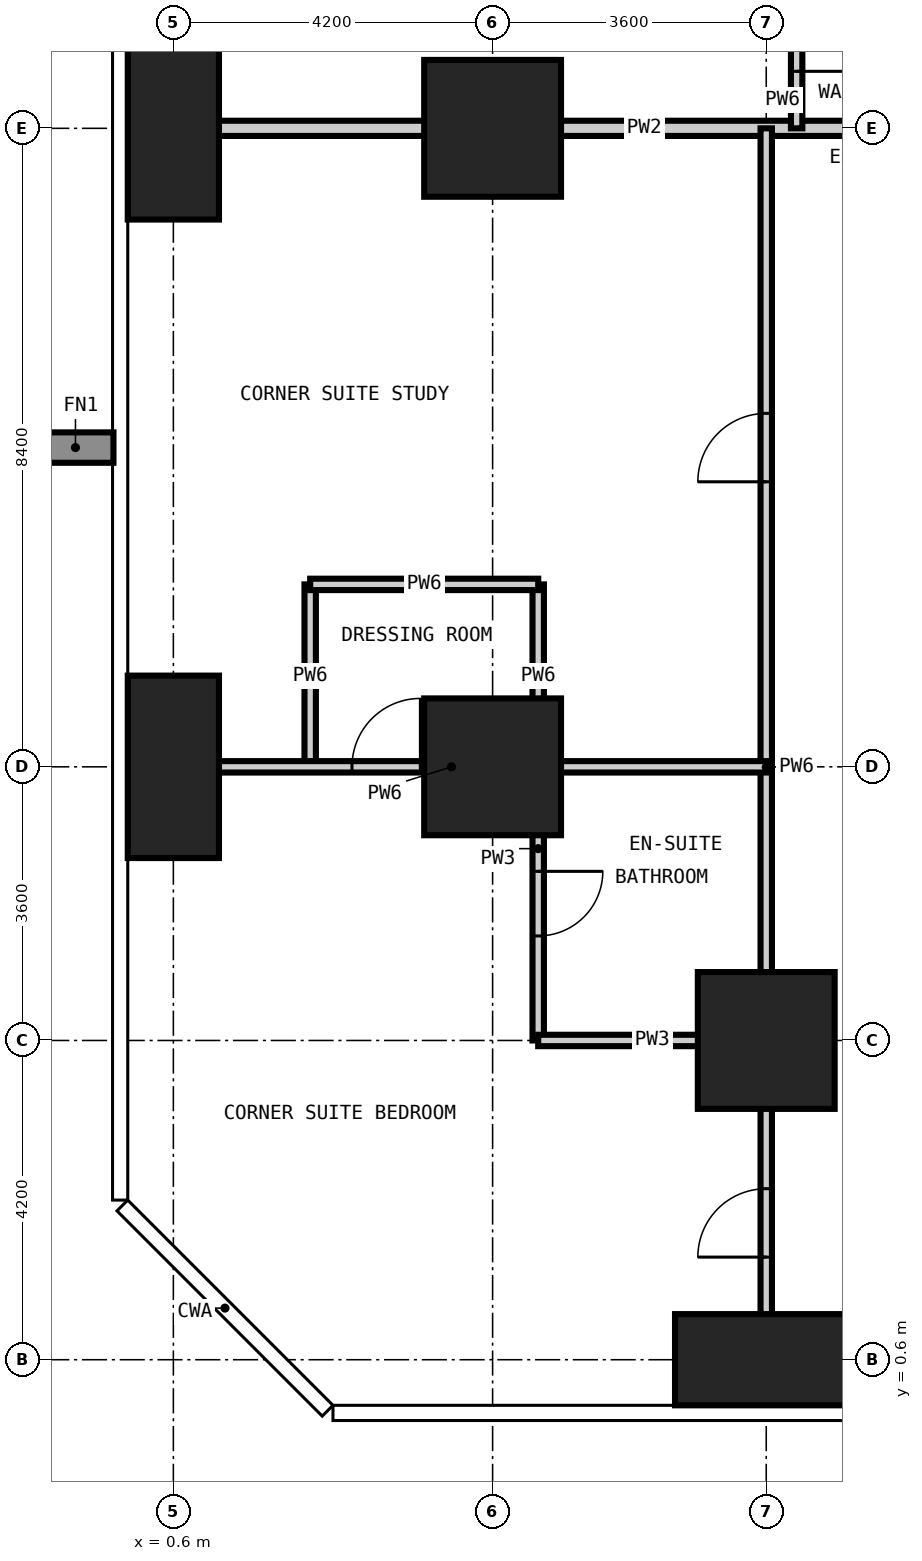
"""IFC4 building model, lengths in metres.
Left out: names, types, materials, properties, quantities, classifications, styles, units other than length and angle.
Written with IfcOpenShell. Run it as: python <this file> out.ifc"""

import sys

from ifc_helpers import new_model, si_unit, direction, frame, frame_2d, origin, origin_2d, place, context, subcontext, project, spatial, rectangle, extrude, element, fill, save


model = new_model("IFC4")
c1 = context("Model", 3, precision=1e-05, world=origin(), true_north=direction((0.0, 1.0)))
c2 = subcontext(c1, "Body", "Model", "MODEL_VIEW")
j1 = project(units=[si_unit("LENGTHUNIT", "METRE"), si_unit("PLANEANGLEUNIT", "RADIAN")], contexts=[c1])
p1 = place(None, origin())
s1 = spatial("IfcSite", under=j1, at=p1, CompositionType="ELEMENT")
p2 = place(p1, origin())
s2 = spatial("IfcBuilding", under=s1, at=p2, CompositionType="ELEMENT")
p3 = place(p2, frame((0.0, 0.0, 30.6)))
s3 = spatial("IfcBuildingStorey", under=s2, at=p3, CompositionType="ELEMENT", Elevation=30.6)
for number, where, z_axis, x_axis in (
    (1, (0.6, 8.4, -0.35), (0.0, 0.0, 1.0), (1.0, 0.0, 0.0)),
    (2, (0.6, 16.8, -0.35), (0.0, 0.0, 1.0), (1.0, 0.0, 0.0)),
):
    element("IfcColumn", number, at=place(p3, frame(where, z_axis=z_axis, x_axis=x_axis)), inside=s3, PredefinedType="COLUMN", context=c2, shape_type="SweptSolid", body=[
        extrude(rectangle(XDim=1.2, YDim=2.4, at=origin_2d()), origin(), (0.0, 0.0, 1.0), 3.6),
    ])
for number, where, z_axis, x_axis in (
    (3, (4.8, 8.4, -0.35), (0.0, 0.0, 1.0), (1.0, 0.0, 0.0)),
    (4, (4.8, 16.8, -0.35), (0.0, 0.0, 1.0), (1.0, 0.0, 0.0)),
):
    element("IfcColumn", number, at=place(p3, frame(where, z_axis=z_axis, x_axis=x_axis)), inside=s3, PredefinedType="COLUMN", context=c2, shape_type="SweptSolid", body=[
        extrude(rectangle(XDim=1.8, YDim=1.8, at=origin_2d()), origin(), (0.0, 0.0, 1.0), 3.6),
    ])
p4 = place(p3, frame((8.4, 0.6, -0.35), z_axis=(0.0, 0.0, 1.0), x_axis=(1.0, 0.0, 0.0)))
e5 = element("IfcColumn", 5, at=p4, inside=s3, PredefinedType="COLUMN", context=c2, shape_type="SweptSolid", body=[
    extrude(rectangle(XDim=2.4, YDim=1.2, at=origin_2d()), origin(), (0.0, 0.0, 1.0), 3.6),
])
p5 = place(p3, frame((8.4, 4.8, -0.35), z_axis=(0.0, 0.0, 1.0), x_axis=(1.0, 0.0, 0.0)))
e6 = element("IfcColumn", 6, at=p5, inside=s3, PredefinedType="COLUMN", context=c2, shape_type="SweptSolid", body=[
    extrude(rectangle(XDim=1.8, YDim=1.8, at=origin_2d()), origin(), (0.0, 0.0, 1.0), 3.6),
])
p6 = place(p3, frame((5.4, 4.8, 0.0), z_axis=(0.0, 0.0, 1.0), x_axis=(0.0, 1.0, 0.0)))
e7 = element("IfcWall", 7, at=p6, inside=s3, PredefinedType="PARTITIONING", context=c2, shape_type="SweptSolid", body=[
    extrude(rectangle(XDim=3.6, YDim=0.15, at=frame_2d((1.8, 0.0))), origin(), (0.0, 0.0, 1.0), 3.25),
])
p7 = place(p6, frame((1.375, 0.0, 0.0)))
e8 = element("IfcOpeningElement", 8, at=p7, cuts=e7, PredefinedType="OPENING", context=c2, shape_type="SweptSolid", body=[
    extrude(rectangle(XDim=0.85, YDim=2.1, at=frame_2d((0.425, 1.05))), frame((0.0, 0.085, 0.0), z_axis=(0.0, -1.0, 0.0), x_axis=(1.0, 0.0, 0.0)), (0.0, 0.0, 1.0), 0.17),
])
p8 = place(p3, frame((5.4, 4.8, 0.0), z_axis=(0.0, 0.0, 1.0), x_axis=(1.0, 0.0, 0.0)))
e9 = element("IfcWall", 9, at=p8, inside=s3, PredefinedType="PARTITIONING", context=c2, shape_type="SweptSolid", body=[
    extrude(rectangle(XDim=3.0, YDim=0.15, at=frame_2d((1.5, 0.0))), origin(), (0.0, 0.0, 1.0), 3.25),
])
p9 = place(p3, frame((-0.008, 16.8, 0.0), z_axis=(0.0, 0.0, 1.0), x_axis=(1.0, 0.0, 0.0)))
e10 = element("IfcWall", 10, at=p9, inside=s3, PredefinedType="PARTITIONING", context=c2, shape_type="SweptSolid", body=[
    extrude(rectangle(XDim=13.608, YDim=0.2, at=frame_2d((6.804, 0.0))), origin(), (0.0, 0.0, 1.0), 3.25),
])
for number, where, z_axis, x_axis in (
    (11, (2.4, 8.4, 0.0), (0.0, 0.0, 1.0), (0.0, 1.0, 0.0)),
    (12, (5.4, 8.4, 0.0), (0.0, 0.0, 1.0), (0.0, 1.0, 0.0)),
):
    element("IfcWall", number, at=place(p3, frame(where, z_axis=z_axis, x_axis=x_axis)), inside=s3, PredefinedType="PARTITIONING", context=c2, shape_type="SweptSolid", body=[
        extrude(rectangle(XDim=2.4, YDim=0.15, at=frame_2d((1.2, 0.0))), origin(), (0.0, 0.0, 1.0), 3.25),
    ])
p10 = place(p3, frame((8.4, -0.008, 0.0), z_axis=(0.0, 0.0, 1.0), x_axis=(0.0, 1.0, 0.0)))
e13 = element("IfcWall", 13, at=p10, inside=s3, PredefinedType="PARTITIONING", context=c2, shape_type="SweptSolid", body=[
    extrude(rectangle(XDim=16.808, YDim=0.15, at=frame_2d((8.404, 0.0))), origin(), (0.0, 0.0, 1.0), 3.25),
])
p11 = place(p10, frame((1.958, 0.0, 0.0)))
e14 = element("IfcOpeningElement", 14, at=p11, cuts=e13, PredefinedType="OPENING", context=c2, shape_type="SweptSolid", body=[
    extrude(rectangle(XDim=0.9, YDim=2.1, at=frame_2d((0.45, 1.05))), frame((0.0, 0.085, 0.0), z_axis=(0.0, -1.0, 0.0), x_axis=(1.0, 0.0, 0.0)), (0.0, 0.0, 1.0), 0.17),
])
p12 = place(p10, frame((12.158, 0.0, 0.0)))
e15 = element("IfcOpeningElement", 15, at=p12, cuts=e13, PredefinedType="OPENING", context=c2, shape_type="SweptSolid", body=[
    extrude(rectangle(XDim=0.9, YDim=2.1, at=frame_2d((0.45, 1.05))), frame((0.0, 0.085, 0.0), z_axis=(0.0, -1.0, 0.0), x_axis=(1.0, 0.0, 0.0)), (0.0, 0.0, 1.0), 0.17),
])
p13 = place(p3, frame((8.8, 16.8, 0.0), z_axis=(0.0, 0.0, 1.0), x_axis=(0.0, 1.0, 0.0)))
e16 = element("IfcWall", 16, at=p13, inside=s3, PredefinedType="PARTITIONING", context=c2, shape_type="SweptSolid", body=[
    extrude(rectangle(XDim=2.4, YDim=0.15, at=frame_2d((1.2, 0.0))), origin(), (0.0, 0.0, 1.0), 3.25),
])
p14 = place(p13, frame((0.75, 0.0, 0.0)))
e17 = element("IfcOpeningElement", 17, at=p14, cuts=e16, PredefinedType="OPENING", context=c2, shape_type="SweptSolid", body=[
    extrude(rectangle(XDim=0.9, YDim=2.1, at=frame_2d((0.45, 1.05))), frame((0.0, 0.085, 0.0), z_axis=(0.0, -1.0, 0.0), x_axis=(1.0, 0.0, 0.0)), (0.0, 0.0, 1.0), 0.17),
])
p15 = place(p3, frame((-0.008, 8.4, 0.0), z_axis=(0.0, 0.0, 1.0), x_axis=(1.0, 0.0, 0.0)))
e18 = element("IfcWall", 18, at=p15, inside=s3, PredefinedType="PARTITIONING", context=c2, shape_type="SweptSolid", body=[
    extrude(rectangle(XDim=8.408, YDim=0.15, at=frame_2d((4.204, 0.0))), origin(), (0.0, 0.0, 1.0), 3.25),
])
p16 = place(p15, frame((2.958, 0.0, 0.0)))
e19 = element("IfcOpeningElement", 19, at=p16, cuts=e18, PredefinedType="OPENING", context=c2, shape_type="SweptSolid", body=[
    extrude(rectangle(XDim=0.9, YDim=2.1, at=frame_2d((0.45, 1.05))), frame((0.0, 0.085, 0.0), z_axis=(0.0, -1.0, 0.0), x_axis=(1.0, 0.0, 0.0)), (0.0, 0.0, 1.0), 0.17),
])
p17 = place(p3, frame((2.4, 10.8, 0.0), z_axis=(0.0, 0.0, 1.0), x_axis=(1.0, 0.0, 0.0)))
e20 = element("IfcWall", 20, at=p17, inside=s3, PredefinedType="PARTITIONING", context=c2, shape_type="SweptSolid", body=[
    extrude(rectangle(XDim=3.0, YDim=0.15, at=frame_2d((1.5, 0.0))), origin(), (0.0, 0.0, 1.0), 3.25),
])
p18 = place(p14, frame((0.9, 0.0, 0.0), z_axis=(0.0, 0.0, 1.0), x_axis=(-1.0, 0.0, 0.0)))
e21 = element("IfcDoor", 21, at=p18, inside=s3, OperationType="SINGLE_SWING_RIGHT", PredefinedType="DOOR", context=c2, shape_type="SweptSolid", body=[
    extrude(rectangle(XDim=0.9, YDim=2.1, at=frame_2d((0.45, 1.05))), frame((0.0, 0.025, 0.0), z_axis=(0.0, -1.0, 0.0), x_axis=(1.0, 0.0, 0.0)), (0.0, 0.0, 1.0), 0.05),
])
fill(e17, e21)
p19 = place(p11, origin())
e22 = element("IfcDoor", 22, at=p19, inside=s3, OperationType="SINGLE_SWING_LEFT", PredefinedType="DOOR", context=c2, shape_type="SweptSolid", body=[
    extrude(rectangle(XDim=0.9, YDim=2.1, at=frame_2d((0.45, 1.05))), frame((0.0, 0.025, 0.0), z_axis=(0.0, -1.0, 0.0), x_axis=(1.0, 0.0, 0.0)), (0.0, 0.0, 1.0), 0.05),
])
fill(e14, e22)
p20 = place(p7, frame((0.85, 0.0, 0.0), z_axis=(0.0, 0.0, 1.0), x_axis=(-1.0, 0.0, 0.0)))
e23 = element("IfcDoor", 23, at=p20, inside=s3, OperationType="SINGLE_SWING_LEFT", PredefinedType="DOOR", context=c2, shape_type="SweptSolid", body=[
    extrude(rectangle(XDim=0.85, YDim=2.1, at=frame_2d((0.425, 1.05))), frame((0.0, 0.025, 0.0), z_axis=(0.0, -1.0, 0.0), x_axis=(1.0, 0.0, 0.0)), (0.0, 0.0, 1.0), 0.05),
])
fill(e8, e23)
p21 = place(p16, origin())
e24 = element("IfcDoor", 24, at=p21, inside=s3, OperationType="SINGLE_SWING_RIGHT", PredefinedType="DOOR", context=c2, shape_type="SweptSolid", body=[
    extrude(rectangle(XDim=0.9, YDim=2.1, at=frame_2d((0.45, 1.05))), frame((0.0, 0.025, 0.0), z_axis=(0.0, -1.0, 0.0), x_axis=(1.0, 0.0, 0.0)), (0.0, 0.0, 1.0), 0.05),
])
fill(e19, e24)
p22 = place(p12, origin())
e25 = element("IfcDoor", 25, at=p22, inside=s3, OperationType="SINGLE_SWING_LEFT", PredefinedType="DOOR", context=c2, shape_type="SweptSolid", body=[
    extrude(rectangle(XDim=0.9, YDim=2.1, at=frame_2d((0.45, 1.05))), frame((0.0, 0.025, 0.0), z_axis=(0.0, -1.0, 0.0), x_axis=(1.0, 0.0, 0.0)), (0.0, 0.0, 1.0), 0.05),
])
fill(e15, e25)
save(model, sys.argv[1])
